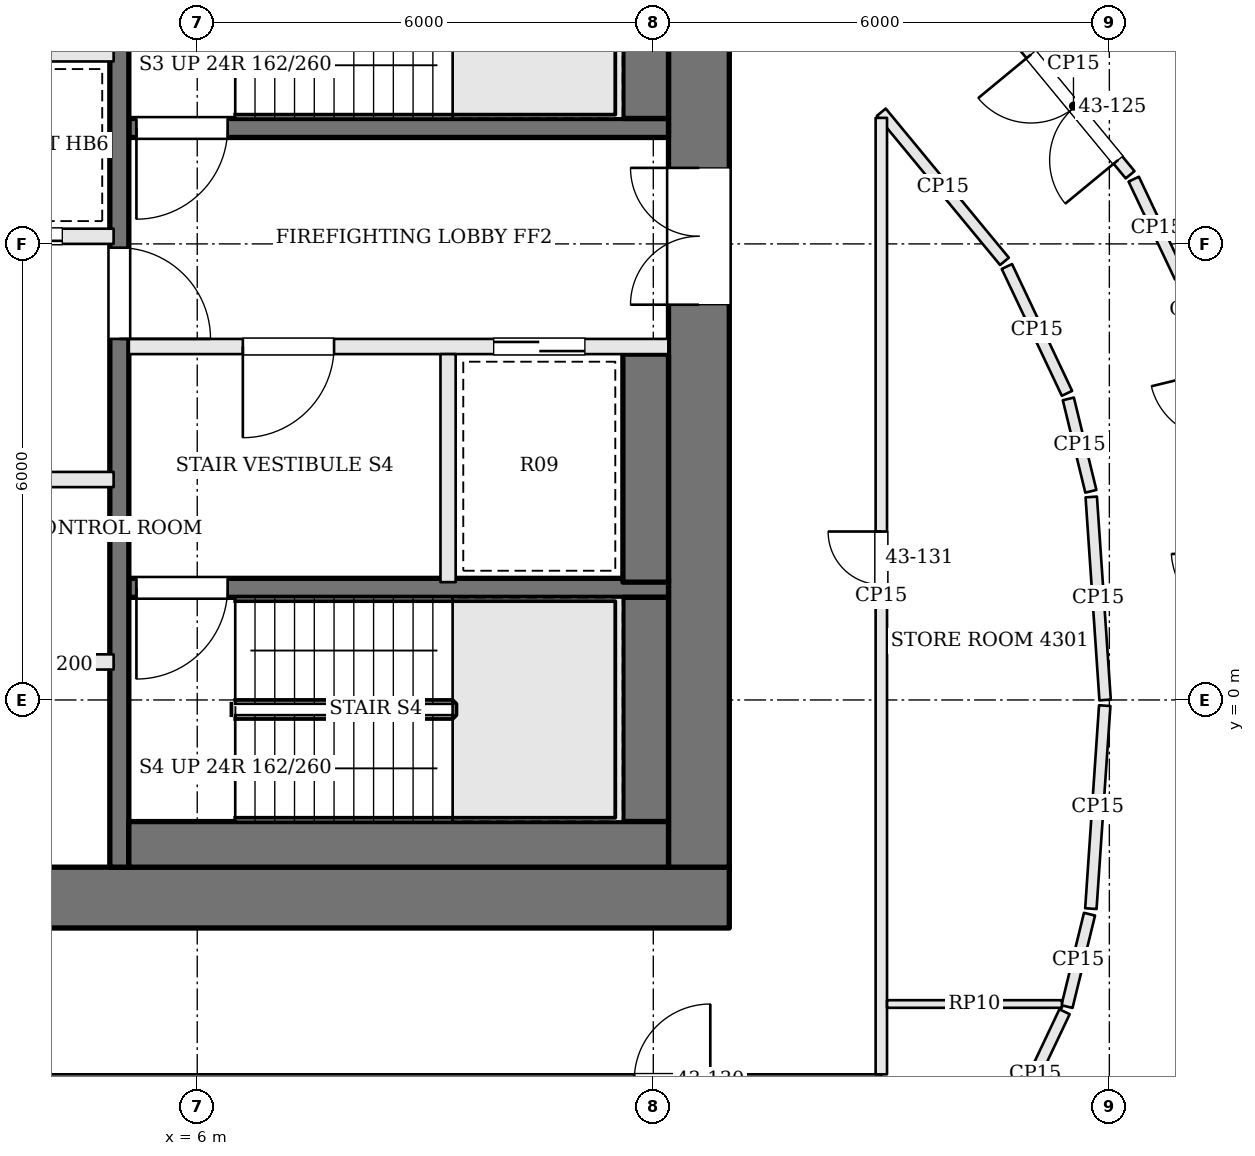
"""IFC4 building model, lengths in metres.
Left out: names, types, materials, properties, quantities, classifications, styles, units other than length and angle.
Written with IfcOpenShell. Run it as: python <this file> out.ifc"""

import sys

from ifc_helpers import new_model, si_unit, direction, frame, frame_2d, origin, place, context, subcontext, project, spatial, rectangle, extrude, element, fill, save


model = new_model("IFC4")
c1 = context("Model", 3, precision=1e-05, world=origin(), true_north=direction((0.0, 1.0)))
c2 = subcontext(c1, "Body", "Model", "MODEL_VIEW")
j1 = project(units=[si_unit("LENGTHUNIT", "METRE"), si_unit("PLANEANGLEUNIT", "RADIAN")], contexts=[c1])
p1 = place(None, origin())
s1 = spatial("IfcSite", under=j1, at=p1, CompositionType="ELEMENT")
p2 = place(p1, origin())
s2 = spatial("IfcBuilding", under=s1, at=p2, CompositionType="ELEMENT")
p3 = place(p2, frame((0.0, 0.0, 177.9)))
s3 = spatial("IfcBuildingStorey", under=s2, at=p3, CompositionType="ELEMENT", Elevation=177.9)
p4 = place(p3, frame((-13.0, -2.6, 0.0), z_axis=(0.0, 0.0, 1.0), x_axis=(1.0, 0.0, 0.0)))
e1 = element("IfcWall", 1, at=p4, inside=s3, PredefinedType="SHEAR", context=c2, shape_type="SweptSolid", body=[
    extrude(rectangle(XDim=26.0, YDim=0.8, at=frame_2d((13.0, 0.0))), origin(), (0.0, 0.0, 1.0), 3.9),
])
p5 = place(p4, frame((8.925, 0.0, 0.0)))
e2 = element("IfcOpeningElement", 2, at=p5, cuts=e1, PredefinedType="OPENING", context=c2, shape_type="SweptSolid", body=[
    extrude(rectangle(XDim=0.9, YDim=2.1, at=frame_2d((0.45, 1.05))), frame((0.0, 0.41, 0.0), z_axis=(0.0, -1.0, 0.0), x_axis=(1.0, 0.0, 0.0)), (0.0, 0.0, 1.0), 0.82),
])
p6 = place(p4, frame((11.475, 0.0, 0.0)))
e3 = element("IfcOpeningElement", 3, at=p6, cuts=e1, PredefinedType="OPENING", context=c2, shape_type="SweptSolid", body=[
    extrude(rectangle(XDim=0.9, YDim=2.1, at=frame_2d((0.45, 1.05))), frame((0.0, 0.41, 0.0), z_axis=(0.0, -1.0, 0.0), x_axis=(1.0, 0.0, 0.0)), (0.0, 0.0, 1.0), 0.82),
])
p7 = place(p4, frame((13.6, 0.0, 0.0)))
e4 = element("IfcOpeningElement", 4, at=p7, cuts=e1, PredefinedType="OPENING", context=c2, shape_type="SweptSolid", body=[
    extrude(rectangle(XDim=1.0, YDim=2.1, at=frame_2d((0.5, 1.05))), frame((0.0, 0.41, 0.0), z_axis=(0.0, -1.0, 0.0), x_axis=(1.0, 0.0, 0.0)), (0.0, 0.0, 1.0), 0.82),
])
p8 = place(p4, frame((15.95, 0.0, 0.0)))
e5 = element("IfcOpeningElement", 5, at=p8, cuts=e1, PredefinedType="OPENING", context=c2, shape_type="SweptSolid", body=[
    extrude(rectangle(XDim=1.0, YDim=2.1, at=frame_2d((0.5, 1.05))), frame((0.0, 0.41, 0.0), z_axis=(0.0, -1.0, 0.0), x_axis=(1.0, 0.0, 0.0)), (0.0, 0.0, 1.0), 0.82),
])
p9 = place(p3, frame((12.6, -2.2, 0.0), z_axis=(0.0, 0.0, 1.0), x_axis=(0.0, 1.0, 0.0)))
e6 = element("IfcWall", 6, at=p9, inside=s3, PredefinedType="SHEAR", context=c2, shape_type="SweptSolid", body=[
    extrude(rectangle(XDim=13.4, YDim=0.8, at=frame_2d((6.7, 0.0))), origin(), (0.0, 0.0, 1.0), 3.9),
])
p10 = place(p9, frame((7.4, 0.0, 0.0)))
e7 = element("IfcOpeningElement", 7, at=p10, cuts=e6, PredefinedType="OPENING", context=c2, shape_type="SweptSolid", body=[
    extrude(rectangle(XDim=1.8, YDim=2.1, at=frame_2d((0.9, 1.05))), frame((0.0, 0.41, 0.0), z_axis=(0.0, -1.0, 0.0), x_axis=(1.0, 0.0, 0.0)), (0.0, 0.0, 1.0), 0.82),
])
p11 = place(p3, frame((12.2, 7.525, 0.0), z_axis=(0.0, 0.0, 1.0), x_axis=(-1.0, 0.0, 0.0)))
e8 = element("IfcWall", 8, at=p11, inside=s3, PredefinedType="SOLIDWALL", context=c2, shape_type="SweptSolid", body=[
    extrude(rectangle(XDim=7.1, YDim=0.25, at=frame_2d((3.55, 0.0))), origin(), (0.0, 0.0, 1.0), 3.7),
])
p12 = place(p11, frame((5.8, 0.0, 0.0)))
e9 = element("IfcOpeningElement", 9, at=p12, cuts=e8, PredefinedType="OPENING", context=c2, shape_type="SweptSolid", body=[
    extrude(rectangle(XDim=1.2, YDim=2.1, at=frame_2d((0.6, 1.05))), frame((0.0, 0.135, 0.0), z_axis=(0.0, -1.0, 0.0), x_axis=(1.0, 0.0, 0.0)), (0.0, 0.0, 1.0), 0.27),
])
p13 = place(p3, frame((12.2, 4.65, 0.0), z_axis=(0.0, 0.0, 1.0), x_axis=(-1.0, 0.0, 0.0)))
e10 = element("IfcWall", 10, at=p13, inside=s3, PredefinedType="SOLIDWALL", context=c2, shape_type="SweptSolid", body=[
    extrude(rectangle(XDim=7.1, YDim=0.2, at=frame_2d((3.55, 0.0))), origin(), (0.0, 0.0, 1.0), 3.7),
])
p14 = place(p13, frame((4.4, 0.0, 0.0)))
e11 = element("IfcOpeningElement", 11, at=p14, cuts=e10, PredefinedType="OPENING", context=c2, shape_type="SweptSolid", body=[
    extrude(rectangle(XDim=1.2, YDim=2.1, at=frame_2d((0.6, 1.05))), frame((0.0, 0.11, 0.0), z_axis=(0.0, -1.0, 0.0), x_axis=(1.0, 0.0, 0.0)), (0.0, 0.0, 1.0), 0.22),
])
p15 = place(p13, frame((1.1, 0.0, 0.0)))
e12 = element("IfcOpeningElement", 12, at=p15, cuts=e10, PredefinedType="OPENING", context=c2, shape_type="SweptSolid", body=[
    extrude(rectangle(XDim=1.2, YDim=2.1, at=frame_2d((0.6, 1.05))), frame((0.0, 0.11, 0.0), z_axis=(0.0, -1.0, 0.0), x_axis=(1.0, 0.0, 0.0)), (0.0, 0.0, 1.0), 0.22),
])
p16 = place(p3, frame((12.2, 1.475, 0.0), z_axis=(0.0, 0.0, 1.0), x_axis=(-1.0, 0.0, 0.0)))
e13 = element("IfcWall", 13, at=p16, inside=s3, PredefinedType="SOLIDWALL", context=c2, shape_type="SweptSolid", body=[
    extrude(rectangle(XDim=7.1, YDim=0.25, at=frame_2d((3.55, 0.0))), origin(), (0.0, 0.0, 1.0), 3.7),
])
p17 = place(p16, frame((5.8, 0.0, 0.0)))
e14 = element("IfcOpeningElement", 14, at=p17, cuts=e13, PredefinedType="OPENING", context=c2, shape_type="SweptSolid", body=[
    extrude(rectangle(XDim=1.2, YDim=2.1, at=frame_2d((0.6, 1.05))), frame((0.0, 0.135, 0.0), z_axis=(0.0, -1.0, 0.0), x_axis=(1.0, 0.0, 0.0)), (0.0, 0.0, 1.0), 0.27),
])
p18 = place(p3, frame((9.3, 4.55, 0.0), z_axis=(0.0, 0.0, 1.0), x_axis=(0.0, -1.0, 0.0)))
e15 = element("IfcWall", 15, at=p18, inside=s3, PredefinedType="SOLIDWALL", context=c2, shape_type="SweptSolid", body=[
    extrude(rectangle(XDim=3.0, YDim=0.2, at=frame_2d((1.5, 0.0))), origin(), (0.0, 0.0, 1.0), 3.7),
])
p19 = place(p3, frame((4.975, 11.2, 0.0), z_axis=(0.0, 0.0, 1.0), x_axis=(0.0, -1.0, 0.0)))
e16 = element("IfcWall", 16, at=p19, inside=s3, PredefinedType="SOLIDWALL", context=c2, shape_type="SweptSolid", body=[
    extrude(rectangle(XDim=13.4, YDim=0.25, at=frame_2d((6.7, 0.0))), origin(), (0.0, 0.0, 1.0), 3.7),
])
p20 = place(p19, frame((5.25, 0.0, 0.0)))
e17 = element("IfcOpeningElement", 17, at=p20, cuts=e16, PredefinedType="OPENING", context=c2, shape_type="SweptSolid", body=[
    extrude(rectangle(XDim=1.2, YDim=2.1, at=frame_2d((0.6, 1.05))), frame((0.0, 0.135, 0.0), z_axis=(0.0, -1.0, 0.0), x_axis=(1.0, 0.0, 0.0)), (0.0, 0.0, 1.0), 0.27),
])
p21 = place(p3, frame((11.9, 10.6, 0.0), z_axis=(0.0, 0.0, 1.0), x_axis=(0.0, -1.0, 0.0)))
e18 = element("IfcWall", 18, at=p21, inside=s3, PredefinedType="SOLIDWALL", context=c2, shape_type="SweptSolid", body=[
    extrude(rectangle(XDim=2.95, YDim=0.6, at=frame_2d((1.475, 0.0))), origin(), (0.0, 0.0, 1.0), 3.7),
])
p22 = place(p3, frame((11.9, 4.55, 0.0), z_axis=(0.0, 0.0, 1.0), x_axis=(0.0, -1.0, 0.0)))
e19 = element("IfcWall", 19, at=p22, inside=s3, PredefinedType="SOLIDWALL", context=c2, shape_type="SweptSolid", body=[
    extrude(rectangle(XDim=3.0, YDim=0.6, at=frame_2d((1.5, 0.0))), origin(), (0.0, 0.0, 1.0), 3.7),
])
p23 = place(p3, frame((11.9, 1.35, 0.0), z_axis=(0.0, 0.0, 1.0), x_axis=(0.0, -1.0, 0.0)))
e20 = element("IfcWall", 20, at=p23, inside=s3, PredefinedType="SOLIDWALL", context=c2, shape_type="SweptSolid", body=[
    extrude(rectangle(XDim=2.95, YDim=0.6, at=frame_2d((1.475, 0.0))), origin(), (0.0, 0.0, 1.0), 3.7),
])
p24 = place(p3, frame((12.2, -1.9, 0.0), z_axis=(0.0, 0.0, 1.0), x_axis=(-1.0, 0.0, 0.0)))
e21 = element("IfcWall", 21, at=p24, inside=s3, PredefinedType="SOLIDWALL", context=c2, shape_type="SweptSolid", body=[
    extrude(rectangle(XDim=7.1, YDim=0.6, at=frame_2d((3.55, 0.0))), origin(), (0.0, 0.0, 1.0), 3.7),
])
p25 = place(p3, frame((-4.9, 0.5, 0.0), z_axis=(0.0, 0.0, 1.0), x_axis=(1.0, 0.0, 0.0)))
e22 = element("IfcWall", 22, at=p25, inside=s3, PredefinedType="SOLIDWALL", context=c2, shape_type="SweptSolid", body=[
    extrude(rectangle(XDim=9.8, YDim=0.2, at=frame_2d((4.9, 0.0))), origin(), (0.0, 0.0, 1.0), 3.7),
])
p26 = place(p3, frame((-4.9, 2.9, 0.0), z_axis=(0.0, 0.0, 1.0), x_axis=(1.0, 0.0, 0.0)))
e23 = element("IfcWall", 23, at=p26, inside=s3, PredefinedType="SOLIDWALL", context=c2, shape_type="SweptSolid", body=[
    extrude(rectangle(XDim=9.8, YDim=0.2, at=frame_2d((4.9, 0.0))), origin(), (0.0, 0.0, 1.0), 3.7),
])
p27 = place(p26, frame((0.675, 0.0, 0.0)))
e24 = element("IfcOpeningElement", 24, at=p27, cuts=e23, PredefinedType="OPENING", context=c2, shape_type="SweptSolid", body=[
    extrude(rectangle(XDim=1.1, YDim=2.1, at=frame_2d((0.55, 1.05))), frame((0.0, 0.11, 0.0), z_axis=(0.0, -1.0, 0.0), x_axis=(1.0, 0.0, 0.0)), (0.0, 0.0, 1.0), 0.22),
])
p28 = place(p26, frame((2.613, 0.0, 0.0)))
e25 = element("IfcOpeningElement", 25, at=p28, cuts=e23, PredefinedType="OPENING", context=c2, shape_type="SweptSolid", body=[
    extrude(rectangle(XDim=0.9, YDim=2.1, at=frame_2d((0.45, 1.05))), frame((0.0, 0.11, 0.0), z_axis=(0.0, -1.0, 0.0), x_axis=(1.0, 0.0, 0.0)), (0.0, 0.0, 1.0), 0.22),
])
p29 = place(p26, frame((4.35, 0.0, 0.0)))
e26 = element("IfcOpeningElement", 26, at=p29, cuts=e23, PredefinedType="OPENING", context=c2, shape_type="SweptSolid", body=[
    extrude(rectangle(XDim=1.1, YDim=2.1, at=frame_2d((0.55, 1.05))), frame((0.0, 0.11, 0.0), z_axis=(0.0, -1.0, 0.0), x_axis=(1.0, 0.0, 0.0)), (0.0, 0.0, 1.0), 0.22),
])
p30 = place(p26, frame((7.463, 0.0, 0.0)))
e27 = element("IfcOpeningElement", 27, at=p30, cuts=e23, PredefinedType="OPENING", context=c2, shape_type="SweptSolid", body=[
    extrude(rectangle(XDim=1.0, YDim=2.1, at=frame_2d((0.5, 1.05))), frame((0.0, 0.11, 0.0), z_axis=(0.0, -1.0, 0.0), x_axis=(1.0, 0.0, 0.0)), (0.0, 0.0, 1.0), 0.22),
])
p31 = place(p3, frame((-4.9, 6.1, 0.0), z_axis=(0.0, 0.0, 1.0), x_axis=(1.0, 0.0, 0.0)))
e28 = element("IfcWall", 28, at=p31, inside=s3, PredefinedType="SOLIDWALL", context=c2, shape_type="SweptSolid", body=[
    extrude(rectangle(XDim=9.8, YDim=0.2, at=frame_2d((4.9, 0.0))), origin(), (0.0, 0.0, 1.0), 3.7),
])
p32 = place(p31, frame((0.675, 0.0, 0.0)))
e29 = element("IfcOpeningElement", 29, at=p32, cuts=e28, PredefinedType="OPENING", context=c2, shape_type="SweptSolid", body=[
    extrude(rectangle(XDim=1.1, YDim=2.1, at=frame_2d((0.55, 1.05))), frame((0.0, 0.11, 0.0), z_axis=(0.0, -1.0, 0.0), x_axis=(1.0, 0.0, 0.0)), (0.0, 0.0, 1.0), 0.22),
])
p33 = place(p31, frame((3.125, 0.0, 0.0)))
e30 = element("IfcOpeningElement", 30, at=p33, cuts=e28, PredefinedType="OPENING", context=c2, shape_type="SweptSolid", body=[
    extrude(rectangle(XDim=1.1, YDim=2.1, at=frame_2d((0.55, 1.05))), frame((0.0, 0.11, 0.0), z_axis=(0.0, -1.0, 0.0), x_axis=(1.0, 0.0, 0.0)), (0.0, 0.0, 1.0), 0.22),
])
p34 = place(p31, frame((5.575, 0.0, 0.0)))
e31 = element("IfcOpeningElement", 31, at=p34, cuts=e28, PredefinedType="OPENING", context=c2, shape_type="SweptSolid", body=[
    extrude(rectangle(XDim=1.1, YDim=2.1, at=frame_2d((0.55, 1.05))), frame((0.0, 0.11, 0.0), z_axis=(0.0, -1.0, 0.0), x_axis=(1.0, 0.0, 0.0)), (0.0, 0.0, 1.0), 0.22),
])
p35 = place(p31, frame((8.025, 0.0, 0.0)))
e32 = element("IfcOpeningElement", 32, at=p35, cuts=e28, PredefinedType="OPENING", context=c2, shape_type="SweptSolid", body=[
    extrude(rectangle(XDim=1.1, YDim=2.1, at=frame_2d((0.55, 1.05))), frame((0.0, 0.11, 0.0), z_axis=(0.0, -1.0, 0.0), x_axis=(1.0, 0.0, 0.0)), (0.0, 0.0, 1.0), 0.22),
])
p36 = place(p3, frame((-4.9, 8.5, 0.0), z_axis=(0.0, 0.0, 1.0), x_axis=(1.0, 0.0, 0.0)))
e33 = element("IfcWall", 33, at=p36, inside=s3, PredefinedType="SOLIDWALL", context=c2, shape_type="SweptSolid", body=[
    extrude(rectangle(XDim=9.8, YDim=0.2, at=frame_2d((4.9, 0.0))), origin(), (0.0, 0.0, 1.0), 3.7),
])
p37 = place(p3, frame((18.931, 5.563, 0.0), z_axis=(0.0, 0.0, 1.0), x_axis=(-0.428204145682, 0.903682029046, 0.0)))
e34 = element("IfcWall", 34, at=p37, inside=s3, PredefinedType="PARTITIONING", context=c2, shape_type="SweptSolid", body=[
    extrude(rectangle(XDim=1.425, YDim=0.15, at=frame_2d((0.713, 0.0))), origin(), (0.0, 0.0, 1.0), 3.084),
])
p38 = place(p3, frame((18.273, 6.909, 0.0), z_axis=(0.0, 0.0, 1.0), x_axis=(-0.63653648943, 0.771246586783, 0.0)))
e35 = element("IfcWall", 35, at=p38, inside=s3, PredefinedType="PARTITIONING", context=c2, shape_type="SweptSolid", body=[
    extrude(rectangle(XDim=2.342, YDim=0.15, at=frame_2d((1.171, 0.0))), origin(), (0.0, 0.0, 1.0), 3.084),
])
p39 = place(p38, frame((0.25, 0.0, 0.0)))
e36 = element("IfcOpeningElement", 36, at=p39, cuts=e35, PredefinedType="OPENING", context=c2, shape_type="SweptSolid", body=[
    extrude(rectangle(XDim=1.8, YDim=2.1, at=frame_2d((0.9, 1.05))), frame((0.0, 0.085, 0.0), z_axis=(0.0, -1.0, 0.0), x_axis=(1.0, 0.0, 0.0)), (0.0, 0.0, 1.0), 0.17),
])
p40 = place(p3, frame((15.0, 7.733, 0.0), z_axis=(0.0, 0.0, 1.0), x_axis=(0.636601263488, -0.771193121938, 0.0)))
e37 = element("IfcWall", 37, at=p40, inside=s3, PredefinedType="PARTITIONING", context=c2, shape_type="SweptSolid", body=[
    extrude(rectangle(XDim=2.545, YDim=0.15, at=frame_2d((1.272, 0.0))), origin(), (0.0, 0.0, 1.0), 3.084),
])
p41 = place(p3, frame((16.652, 5.702, 0.0), z_axis=(0.0, 0.0, 1.0), x_axis=(0.428126129773, -0.903718992279, 0.0)))
e38 = element("IfcWall", 38, at=p41, inside=s3, PredefinedType="PARTITIONING", context=c2, shape_type="SweptSolid", body=[
    extrude(rectangle(XDim=1.846, YDim=0.15, at=frame_2d((0.923, 0.0))), origin(), (0.0, 0.0, 1.0), 3.084),
])
p42 = place(p3, frame((17.46, 3.961, 0.0), z_axis=(0.0, 0.0, 1.0), x_axis=(0.236655249498, -0.971593687137, 0.0)))
e39 = element("IfcWall", 39, at=p42, inside=s3, PredefinedType="PARTITIONING", context=c2, shape_type="SweptSolid", body=[
    extrude(rectangle(XDim=1.251, YDim=0.15, at=frame_2d((0.626, 0.0))), origin(), (0.0, 0.0, 1.0), 3.084),
])
p43 = place(p3, frame((17.762, 2.67, 0.0), z_axis=(0.0, 0.0, 1.0), x_axis=(0.068135311644, -0.997676089373, 0.0)))
e40 = element("IfcWall", 40, at=p43, inside=s3, PredefinedType="PARTITIONING", context=c2, shape_type="SweptSolid", body=[
    extrude(rectangle(XDim=2.677, YDim=0.15, at=frame_2d((1.338, 0.0))), origin(), (0.0, 0.0, 1.0), 3.084),
])
p44 = place(p3, frame((17.939, -0.075, 0.0), z_axis=(0.0, 0.0, 1.0), x_axis=(-0.068226099283, -0.99766988497, 0.0)))
e41 = element("IfcWall", 41, at=p44, inside=s3, PredefinedType="PARTITIONING", context=c2, shape_type="SweptSolid", body=[
    extrude(rectangle(XDim=2.677, YDim=0.15, at=frame_2d((1.338, 0.0))), origin(), (0.0, 0.0, 1.0), 3.084),
])
p45 = place(p3, frame((17.739, -2.818, 0.0), z_axis=(0.0, 0.0, 1.0), x_axis=(-0.236884307907, -0.971537865792, 0.0)))
e42 = element("IfcWall", 42, at=p45, inside=s3, PredefinedType="PARTITIONING", context=c2, shape_type="SweptSolid", body=[
    extrude(rectangle(XDim=1.251, YDim=0.15, at=frame_2d((0.625, 0.0))), origin(), (0.0, 0.0, 1.0), 3.084),
])
p46 = place(p3, frame((17.41, -4.102, 0.0), z_axis=(0.0, 0.0, 1.0), x_axis=(-0.428074720318, -0.903743345107, 0.0)))
e43 = element("IfcWall", 43, at=p46, inside=s3, PredefinedType="PARTITIONING", context=c2, shape_type="SweptSolid", body=[
    extrude(rectangle(XDim=1.806, YDim=0.15, at=frame_2d((0.903, 0.0))), origin(), (0.0, 0.0, 1.0), 3.084),
])
p47 = place(p3, frame((-14.925, -5.0, 0.0), z_axis=(0.0, 0.0, 1.0), x_axis=(1.0, 0.0, 0.0)))
e44 = element("IfcWall", 44, at=p47, inside=s3, PredefinedType="PARTITIONING", context=c2, shape_type="SweptSolid", body=[
    extrude(rectangle(XDim=29.925, YDim=0.15, at=frame_2d((14.962, 0.0))), origin(), (0.0, 0.0, 1.0), 3.084),
])
p48 = place(p47, frame((2.175, 0.0, 0.0)))
e45 = element("IfcOpeningElement", 45, at=p48, cuts=e44, PredefinedType="OPENING", context=c2, shape_type="SweptSolid", body=[
    extrude(rectangle(XDim=1.0, YDim=2.1, at=frame_2d((0.5, 1.05))), frame((0.0, 0.085, 0.0), z_axis=(0.0, -1.0, 0.0), x_axis=(1.0, 0.0, 0.0)), (0.0, 0.0, 1.0), 0.17),
])
p49 = place(p47, frame((14.025, 0.0, 0.0)))
e46 = element("IfcOpeningElement", 46, at=p49, cuts=e44, PredefinedType="OPENING", context=c2, shape_type="SweptSolid", body=[
    extrude(rectangle(XDim=1.8, YDim=2.1, at=frame_2d((0.9, 1.05))), frame((0.0, 0.085, 0.0), z_axis=(0.0, -1.0, 0.0), x_axis=(1.0, 0.0, 0.0)), (0.0, 0.0, 1.0), 0.17),
])
p50 = place(p47, frame((26.675, 0.0, 0.0)))
e47 = element("IfcOpeningElement", 47, at=p50, cuts=e44, PredefinedType="OPENING", context=c2, shape_type="SweptSolid", body=[
    extrude(rectangle(XDim=1.0, YDim=2.1, at=frame_2d((0.5, 1.05))), frame((0.0, 0.085, 0.0), z_axis=(0.0, -1.0, 0.0), x_axis=(1.0, 0.0, 0.0)), (0.0, 0.0, 1.0), 0.17),
])
p51 = place(p3, frame((15.0, -4.925, 0.0), z_axis=(0.0, 0.0, 1.0), x_axis=(0.0, 1.0, 0.0)))
e48 = element("IfcWall", 48, at=p51, inside=s3, PredefinedType="PARTITIONING", context=c2, shape_type="SweptSolid", body=[
    extrude(rectangle(XDim=12.583, YDim=0.15, at=frame_2d((6.292, 0.0))), origin(), (0.0, 0.0, 1.0), 3.084),
])
p52 = place(p51, frame((6.441, 0.0, 0.0)))
e49 = element("IfcOpeningElement", 49, at=p52, cuts=e48, PredefinedType="OPENING", context=c2, shape_type="SweptSolid", body=[
    extrude(rectangle(XDim=0.7, YDim=2.1, at=frame_2d((0.35, 1.05))), frame((0.0, 0.085, 0.0), z_axis=(0.0, -1.0, 0.0), x_axis=(1.0, 0.0, 0.0)), (0.0, 0.0, 1.0), 0.17),
])
p53 = place(p3, frame((15.075, -4.0, 0.0), z_axis=(0.0, 0.0, 1.0), x_axis=(1.0, 0.0, 0.0)))
e50 = element("IfcWall", 50, at=p53, inside=s3, PredefinedType="PARTITIONING", context=c2, shape_type="SweptSolid", body=[
    extrude(rectangle(XDim=2.301, YDim=0.1, at=frame_2d((1.15, 0.0))), origin(), (0.0, 0.0, 1.0), 3.084),
])
p54 = place(p10, origin())
e51 = element("IfcDoor", 51, at=p54, inside=s3, OperationType="DOUBLE_DOOR_SINGLE_SWING", PredefinedType="DOOR", context=c2, shape_type="SweptSolid", body=[
    extrude(rectangle(XDim=1.8, YDim=2.1, at=frame_2d((0.9, 1.05))), frame((0.0, 0.025, 0.0), z_axis=(0.0, -1.0, 0.0), x_axis=(1.0, 0.0, 0.0)), (0.0, 0.0, 1.0), 0.05),
])
fill(e7, e51)
p55 = place(p20, origin())
e52 = element("IfcDoor", 52, at=p55, inside=s3, OperationType="SINGLE_SWING_RIGHT", PredefinedType="DOOR", context=c2, shape_type="SweptSolid", body=[
    extrude(rectangle(XDim=1.2, YDim=2.1, at=frame_2d((0.6, 1.05))), frame((0.0, 0.025, 0.0), z_axis=(0.0, -1.0, 0.0), x_axis=(1.0, 0.0, 0.0)), (0.0, 0.0, 1.0), 0.05),
])
fill(e17, e52)
p56 = place(p14, origin())
e53 = element("IfcDoor", 53, at=p56, inside=s3, OperationType="SINGLE_SWING_RIGHT", PredefinedType="DOOR", context=c2, shape_type="SweptSolid", body=[
    extrude(rectangle(XDim=1.2, YDim=2.1, at=frame_2d((0.6, 1.05))), frame((0.0, 0.025, 0.0), z_axis=(0.0, -1.0, 0.0), x_axis=(1.0, 0.0, 0.0)), (0.0, 0.0, 1.0), 0.05),
])
fill(e11, e53)
p57 = place(p12, origin())
e54 = element("IfcDoor", 54, at=p57, inside=s3, OperationType="SINGLE_SWING_RIGHT", PredefinedType="DOOR", context=c2, shape_type="SweptSolid", body=[
    extrude(rectangle(XDim=1.2, YDim=2.1, at=frame_2d((0.6, 1.05))), frame((0.0, 0.025, 0.0), z_axis=(0.0, -1.0, 0.0), x_axis=(1.0, 0.0, 0.0)), (0.0, 0.0, 1.0), 0.05),
])
fill(e9, e54)
p58 = place(p17, origin())
e55 = element("IfcDoor", 55, at=p58, inside=s3, OperationType="SINGLE_SWING_RIGHT", PredefinedType="DOOR", context=c2, shape_type="SweptSolid", body=[
    extrude(rectangle(XDim=1.2, YDim=2.1, at=frame_2d((0.6, 1.05))), frame((0.0, 0.025, 0.0), z_axis=(0.0, -1.0, 0.0), x_axis=(1.0, 0.0, 0.0)), (0.0, 0.0, 1.0), 0.05),
])
fill(e14, e55)
p59 = place(p15, origin())
e56 = element("IfcDoor", 56, at=p59, inside=s3, OperationType="SLIDING_TO_RIGHT", PredefinedType="DOOR", context=c2, shape_type="SweptSolid", body=[
    extrude(rectangle(XDim=1.2, YDim=2.1, at=frame_2d((0.6, 1.05))), frame((0.0, 0.025, 0.0), z_axis=(0.0, -1.0, 0.0), x_axis=(1.0, 0.0, 0.0)), (0.0, 0.0, 1.0), 0.05),
])
fill(e12, e56)
p60 = place(p35, origin())
e57 = element("IfcDoor", 57, at=p60, inside=s3, OperationType="SLIDING_TO_LEFT", PredefinedType="DOOR", context=c2, shape_type="SweptSolid", body=[
    extrude(rectangle(XDim=1.1, YDim=2.1, at=frame_2d((0.55, 1.05))), frame((0.0, 0.025, 0.0), z_axis=(0.0, -1.0, 0.0), x_axis=(1.0, 0.0, 0.0)), (0.0, 0.0, 1.0), 0.05),
])
fill(e32, e57)
p61 = place(p39, origin())
e58 = element("IfcDoor", 58, at=p61, inside=s3, OperationType="DOUBLE_DOOR_SINGLE_SWING", PredefinedType="DOOR", context=c2, shape_type="SweptSolid", body=[
    extrude(rectangle(XDim=1.8, YDim=2.1, at=frame_2d((0.9, 1.05))), frame((0.0, 0.025, 0.0), z_axis=(0.0, -1.0, 0.0), x_axis=(1.0, 0.0, 0.0)), (0.0, 0.0, 1.0), 0.05),
])
fill(e36, e58)
p62 = place(p52, origin())
e59 = element("IfcDoor", 59, at=p62, inside=s3, OperationType="SINGLE_SWING_RIGHT", PredefinedType="DOOR", context=c2, shape_type="SweptSolid", body=[
    extrude(rectangle(XDim=0.7, YDim=2.1, at=frame_2d((0.35, 1.05))), frame((0.0, 0.025, 0.0), z_axis=(0.0, -1.0, 0.0), x_axis=(1.0, 0.0, 0.0)), (0.0, 0.0, 1.0), 0.05),
])
fill(e49, e59)
save(model, sys.argv[1])
